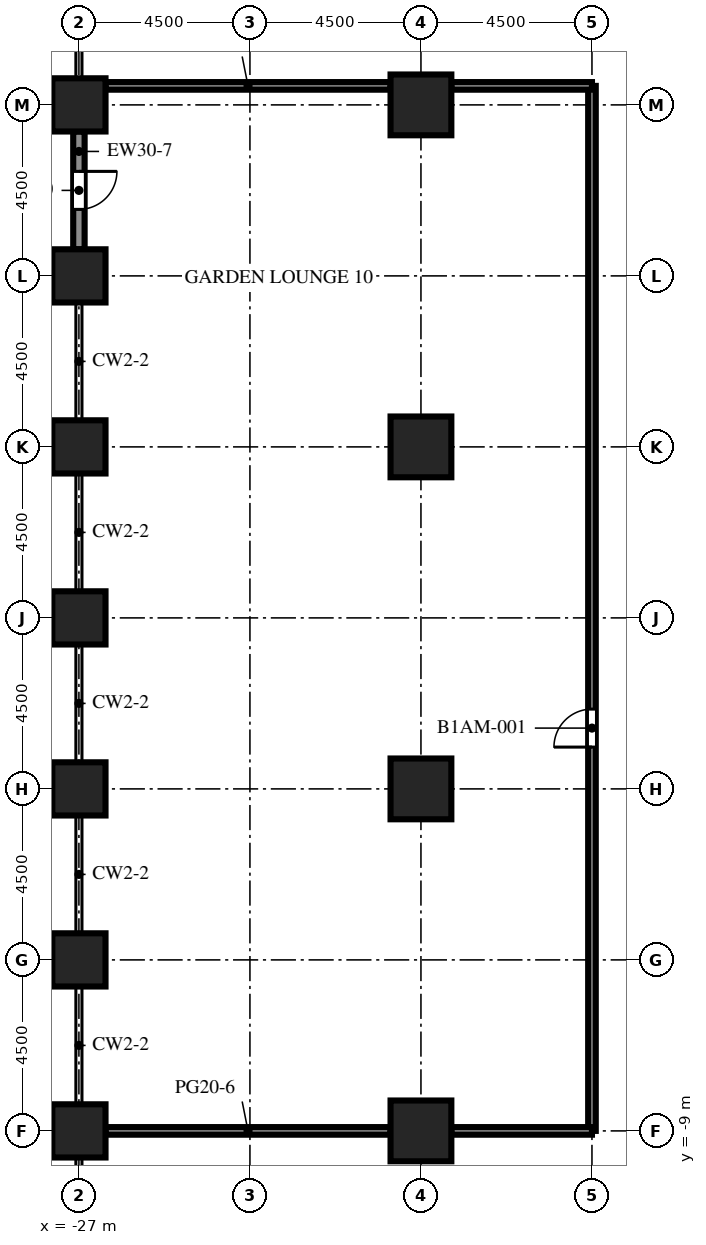
"""IFC4 building model, lengths in metres.
Left out: names, types, materials, properties, quantities, classifications, styles, units other than length and angle.
Written with IfcOpenShell. Run it as: python <this file> out.ifc"""

import sys

from ifc_helpers import new_model, si_unit, direction, frame, frame_2d, origin, origin_2d, place, context, subcontext, project, spatial, rectangle, extrude, element, fill, save


model = new_model("IFC4")
c1 = context("Model", 3, precision=1e-05, world=origin(), true_north=direction((0.0, 1.0)))
c2 = subcontext(c1, "Body", "Model", "MODEL_VIEW")
j1 = project(units=[si_unit("LENGTHUNIT", "METRE"), si_unit("PLANEANGLEUNIT", "RADIAN")], contexts=[c1])
p1 = place(None, origin())
s1 = spatial("IfcSite", under=j1, at=p1, CompositionType="ELEMENT")
p2 = place(p1, origin())
s2 = spatial("IfcBuilding", under=s1, at=p2, CompositionType="ELEMENT")
p3 = place(p2, frame((0.0, 0.0, 35.9)))
s3 = spatial("IfcBuildingStorey", under=s2, at=p3, CompositionType="ELEMENT", Elevation=35.9)
p4 = place(p3, frame((-27.0, -9.0, 0.0), z_axis=(0.0, 0.0, 1.0), x_axis=(1.0, 0.0, 0.0)))
e1 = element("IfcColumn", 1, at=p4, inside=s3, PredefinedType="COLUMN", context=c2, shape_type="SweptSolid", body=[
    extrude(rectangle(XDim=1.4, YDim=1.4, at=origin_2d()), origin(), (0.0, 0.0, 1.0), 3.75),
])
p5 = place(p3, frame((-27.0, -4.5, 0.0), z_axis=(0.0, 0.0, 1.0), x_axis=(1.0, 0.0, 0.0)))
e2 = element("IfcColumn", 2, at=p5, inside=s3, PredefinedType="COLUMN", context=c2, shape_type="SweptSolid", body=[
    extrude(rectangle(XDim=1.4, YDim=1.4, at=origin_2d()), origin(), (0.0, 0.0, 1.0), 6.0),
])
p6 = place(p3, frame((-27.0, 0.0, 0.0), z_axis=(0.0, 0.0, 1.0), x_axis=(1.0, 0.0, 0.0)))
e3 = element("IfcColumn", 3, at=p6, inside=s3, PredefinedType="COLUMN", context=c2, shape_type="SweptSolid", body=[
    extrude(rectangle(XDim=1.4, YDim=1.4, at=origin_2d()), origin(), (0.0, 0.0, 1.0), 3.75),
])
p7 = place(p3, frame((-27.0, 4.5, 0.0), z_axis=(0.0, 0.0, 1.0), x_axis=(1.0, 0.0, 0.0)))
e4 = element("IfcColumn", 4, at=p7, inside=s3, PredefinedType="COLUMN", context=c2, shape_type="SweptSolid", body=[
    extrude(rectangle(XDim=1.4, YDim=1.4, at=origin_2d()), origin(), (0.0, 0.0, 1.0), 6.0),
])
p8 = place(p3, frame((-27.0, 9.0, 0.0), z_axis=(0.0, 0.0, 1.0), x_axis=(1.0, 0.0, 0.0)))
e5 = element("IfcColumn", 5, at=p8, inside=s3, PredefinedType="COLUMN", context=c2, shape_type="SweptSolid", body=[
    extrude(rectangle(XDim=1.4, YDim=1.4, at=origin_2d()), origin(), (0.0, 0.0, 1.0), 3.75),
])
p9 = place(p3, frame((-27.0, 13.5, 0.0), z_axis=(0.0, 0.0, 1.0), x_axis=(1.0, 0.0, 0.0)))
e6 = element("IfcColumn", 6, at=p9, inside=s3, PredefinedType="COLUMN", context=c2, shape_type="SweptSolid", body=[
    extrude(rectangle(XDim=1.4, YDim=1.4, at=origin_2d()), origin(), (0.0, 0.0, 1.0), 6.0),
])
p10 = place(p3, frame((-27.0, 18.0, 0.0), z_axis=(0.0, 0.0, 1.0), x_axis=(1.0, 0.0, 0.0)))
e7 = element("IfcColumn", 7, at=p10, inside=s3, PredefinedType="COLUMN", context=c2, shape_type="SweptSolid", body=[
    extrude(rectangle(XDim=1.4, YDim=1.4, at=origin_2d()), origin(), (0.0, 0.0, 1.0), 3.75),
])
for number, where, z_axis, x_axis in (
    (8, (-18.0, -9.0, 0.0), (0.0, 0.0, 1.0), (1.0, 0.0, 0.0)),
    (9, (-18.0, 0.0, 0.0), (0.0, 0.0, 1.0), (1.0, 0.0, 0.0)),
    (10, (-18.0, 9.0, 0.0), (0.0, 0.0, 1.0), (1.0, 0.0, 0.0)),
    (11, (-18.0, 18.0, 0.0), (0.0, 0.0, 1.0), (1.0, 0.0, 0.0)),
):
    element("IfcColumn", number, at=place(p3, frame(where, z_axis=z_axis, x_axis=x_axis)), inside=s3, PredefinedType="COLUMN", context=c2, shape_type="SweptSolid", body=[
        extrude(rectangle(XDim=1.6, YDim=1.6, at=origin_2d()), origin(), (0.0, 0.0, 1.0), 5.55),
    ])
p11 = place(p3, frame((-27.0, 14.2, 0.0), z_axis=(0.0, 0.0, 1.0), x_axis=(0.0, 1.0, 0.0)))
e12 = element("IfcWall", 12, at=p11, inside=s3, PredefinedType="SOLIDWALL", context=c2, shape_type="SweptSolid", body=[
    extrude(rectangle(XDim=3.1, YDim=0.3, at=frame_2d((1.55, 0.0))), origin(), (0.0, 0.0, 1.0), 4.65),
])
p12 = place(p11, frame((1.05, 0.0, 0.0)))
e13 = element("IfcOpeningElement", 13, at=p12, cuts=e12, PredefinedType="OPENING", context=c2, shape_type="SweptSolid", body=[
    extrude(rectangle(XDim=1.0, YDim=2.2, at=frame_2d((0.5, 1.1))), frame((0.0, 0.16, 0.0), z_axis=(0.0, -1.0, 0.0), x_axis=(1.0, 0.0, 0.0)), (0.0, 0.0, 1.0), 0.32),
])
p13 = place(p3, frame((-13.5, -9.0, 0.0), z_axis=(0.0, 0.0, 1.0), x_axis=(0.0, 1.0, 0.0)))
e14 = element("IfcWall", 14, at=p13, inside=s3, PredefinedType="PARTITIONING", context=c2, shape_type="SweptSolid", body=[
    extrude(rectangle(XDim=27.5, YDim=0.2, at=frame_2d((13.75, 0.0))), origin(), (0.0, 0.0, 1.0), 5.55),
])
p14 = place(p13, frame((10.1, 0.0, 0.0)))
e15 = element("IfcOpeningElement", 15, at=p14, cuts=e14, PredefinedType="OPENING", context=c2, shape_type="SweptSolid", body=[
    extrude(rectangle(XDim=1.0, YDim=2.1, at=frame_2d((0.5, 1.05))), frame((0.0, 0.11, 0.0), z_axis=(0.0, -1.0, 0.0), x_axis=(1.0, 0.0, 0.0)), (0.0, 0.0, 1.0), 0.22),
])
p15 = place(p3, frame((-26.3, -9.0, 0.0), z_axis=(0.0, 0.0, 1.0), x_axis=(1.0, 0.0, 0.0)))
e16 = element("IfcWall", 16, at=p15, inside=s3, PredefinedType="PARTITIONING", context=c2, shape_type="SweptSolid", body=[
    extrude(rectangle(XDim=7.5, YDim=0.2, at=frame_2d((3.75, 0.0))), origin(), (0.0, 0.0, 1.0), 3.72),
])
p16 = place(p3, frame((-17.2, -9.0, 0.0), z_axis=(0.0, 0.0, 1.0), x_axis=(1.0, 0.0, 0.0)))
e17 = element("IfcWall", 17, at=p16, inside=s3, PredefinedType="PARTITIONING", context=c2, shape_type="SweptSolid", body=[
    extrude(rectangle(XDim=3.7, YDim=0.2, at=frame_2d((1.85, 0.0))), origin(), (0.0, 0.0, 1.0), 5.55),
])
p17 = place(p3, frame((-26.3, 18.5, 0.0), z_axis=(0.0, 0.0, 1.0), x_axis=(1.0, 0.0, 0.0)))
e18 = element("IfcWall", 18, at=p17, inside=s3, PredefinedType="PARTITIONING", context=c2, shape_type="SweptSolid", body=[
    extrude(rectangle(XDim=7.5, YDim=0.2, at=frame_2d((3.75, 0.0))), origin(), (0.0, 0.0, 1.0), 3.72),
])
p18 = place(p3, frame((-17.2, 18.5, 0.0), z_axis=(0.0, 0.0, 1.0), x_axis=(1.0, 0.0, 0.0)))
e19 = element("IfcWall", 19, at=p18, inside=s3, PredefinedType="PARTITIONING", context=c2, shape_type="SweptSolid", body=[
    extrude(rectangle(XDim=3.7, YDim=0.2, at=frame_2d((1.85, 0.0))), origin(), (0.0, 0.0, 1.0), 5.55),
])
p19 = place(p12, origin())
e20 = element("IfcDoor", 20, at=p19, inside=s3, OperationType="SINGLE_SWING_RIGHT", PredefinedType="DOOR", context=c2, shape_type="SweptSolid", body=[
    extrude(rectangle(XDim=1.0, YDim=2.2, at=frame_2d((0.5, 1.1))), frame((0.0, 0.025, 0.0), z_axis=(0.0, -1.0, 0.0), x_axis=(1.0, 0.0, 0.0)), (0.0, 0.0, 1.0), 0.05),
])
fill(e13, e20)
p20 = place(p14, origin())
e21 = element("IfcDoor", 21, at=p20, inside=s3, OperationType="SINGLE_SWING_LEFT", PredefinedType="DOOR", context=c2, shape_type="SweptSolid", body=[
    extrude(rectangle(XDim=1.0, YDim=2.1, at=frame_2d((0.5, 1.05))), frame((0.0, 0.025, 0.0), z_axis=(0.0, -1.0, 0.0), x_axis=(1.0, 0.0, 0.0)), (0.0, 0.0, 1.0), 0.05),
])
fill(e15, e21)
save(model, sys.argv[1])
